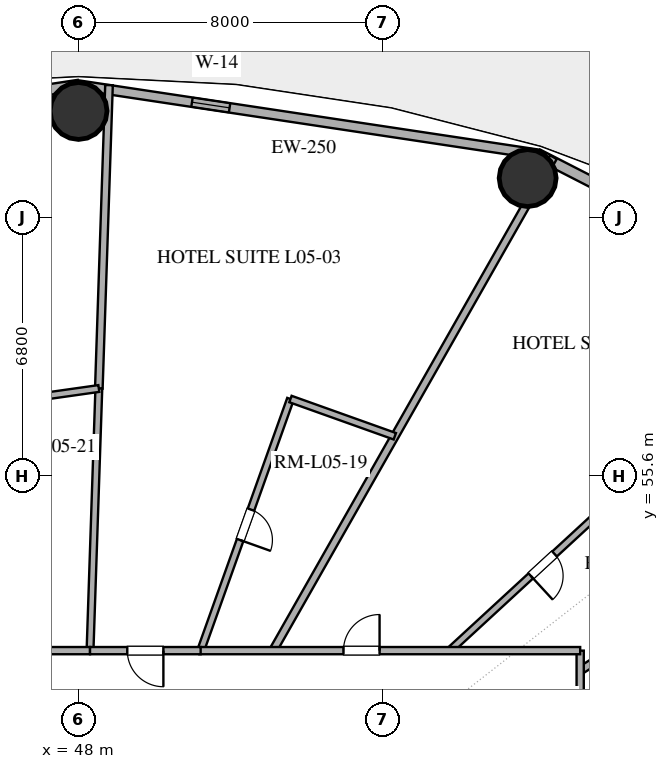
"""IFC4 building model, lengths in metres.
Left out: names, types, materials, properties, quantities, classifications, styles, units other than length and angle.
Written with IfcOpenShell. Run it as: python <this file> out.ifc"""

import sys

from ifc_helpers import new_model, si_unit, direction, frame, frame_2d, origin, origin_2d, place, context, subcontext, project, spatial, rectangle, hollow_circle, extrude, element, fill, save


model = new_model("IFC4")
c1 = context("Model", 3, precision=1e-05, world=origin(), true_north=direction((0.0, 1.0)))
c2 = subcontext(c1, "Body", "Model", "MODEL_VIEW")
j1 = project(units=[si_unit("LENGTHUNIT", "METRE"), si_unit("PLANEANGLEUNIT", "RADIAN")], contexts=[c1])
p1 = place(None, origin())
s1 = spatial("IfcSite", under=j1, at=p1, CompositionType="ELEMENT")
p2 = place(p1, origin())
s2 = spatial("IfcBuilding", under=s1, at=p2, CompositionType="ELEMENT")
p3 = place(p2, frame((0.0, 0.0, 28.2)))
s3 = spatial("IfcBuildingStorey", under=s2, at=p3, CompositionType="ELEMENT", Elevation=28.2)
for number, where, z_axis, x_axis in (
    (1, (59.818, 63.434, 0.0), (0.0, 0.0, 1.0), (1.0, 0.0, 0.0)),
    (2, (48.0, 65.2, 0.0), (0.0, 0.0, 1.0), (1.0, 0.0, 0.0)),
):
    element("IfcColumn", number, at=place(p3, frame(where, z_axis=z_axis, x_axis=x_axis)), inside=s3, PredefinedType="COLUMN", context=c2, shape_type="SweptSolid", body=[
        extrude(hollow_circle(Radius=0.75, WallThickness=0.04, at=origin_2d()), origin(), (0.0, 0.0, 1.0), 3.38),
    ])
p4 = place(p3, frame((70.174, 58.886, 0.0), z_axis=(0.0, 0.0, 1.0), x_axis=(-0.889853976658, 0.456245438581, 0.0)))
e3 = element("IfcWall", 3, at=p4, inside=s3, PredefinedType="SOLIDWALL", context=c2, shape_type="SweptSolid", body=[
    extrude(rectangle(XDim=11.346, YDim=0.28, at=frame_2d((5.673, 0.0))), origin(), (0.0, 0.0, 1.0), 3.38),
])
p5 = place(p4, frame((2.967, 0.0, 0.85)))
e4 = element("IfcOpeningElement", 4, at=p5, cuts=e3, PredefinedType="OPENING", context=c2, shape_type="SweptSolid", body=[
    extrude(rectangle(XDim=2.1, YDim=2.2, at=frame_2d((1.05, 1.1))), frame((0.0, 0.15, 0.0), z_axis=(0.0, -1.0, 0.0), x_axis=(1.0, 0.0, 0.0)), (0.0, 0.0, 1.0), 0.3),
])
p6 = place(p4, frame((6.429, 0.0, 0.85)))
e5 = element("IfcOpeningElement", 5, at=p6, cuts=e3, PredefinedType="OPENING", context=c2, shape_type="SweptSolid", body=[
    extrude(rectangle(XDim=2.1, YDim=2.2, at=frame_2d((1.05, 1.1))), frame((0.0, 0.15, 0.0), z_axis=(0.0, -1.0, 0.0), x_axis=(1.0, 0.0, 0.0)), (0.0, 0.0, 1.0), 0.3),
])
p7 = place(p3, frame((60.078, 64.062, 0.0), z_axis=(0.0, 0.0, 1.0), x_axis=(-0.988864835849, 0.148816452121, 0.0)))
e6 = element("IfcWall", 6, at=p7, inside=s3, PredefinedType="SOLIDWALL", context=c2, shape_type="SweptSolid", body=[
    extrude(rectangle(XDim=12.214, YDim=0.25, at=frame_2d((6.107, 0.0))), origin(), (0.0, 0.0, 1.0), 3.38),
])
p8 = place(p7, frame((8.195, 0.0, 1.42)))
e7 = element("IfcOpeningElement", 7, at=p8, cuts=e6, PredefinedType="OPENING", context=c2, shape_type="SweptSolid", body=[
    extrude(rectangle(XDim=1.0, YDim=1.05, at=frame_2d((0.5, 0.525))), frame((0.0, 0.135, 0.0), z_axis=(0.0, -1.0, 0.0), x_axis=(1.0, 0.0, 0.0)), (0.0, 0.0, 1.0), 0.27),
])
p9 = place(p3, frame((48.0, 65.88, 0.0), z_axis=(0.0, 0.0, 1.0), x_axis=(-0.988864835849, -0.148816452121, 0.0)))
e8 = element("IfcWall", 8, at=p9, inside=s3, PredefinedType="SOLIDWALL", context=c2, shape_type="SweptSolid", body=[
    extrude(rectangle(XDim=12.214, YDim=0.28, at=frame_2d((6.107, 0.0))), origin(), (0.0, 0.0, 1.0), 3.38),
])
p10 = place(p9, frame((1.531, 0.0, 0.0)))
e9 = element("IfcOpeningElement", 9, at=p10, cuts=e8, PredefinedType="OPENING", context=c2, shape_type="SweptSolid", body=[
    extrude(rectangle(XDim=1.1, YDim=2.25, at=frame_2d((0.55, 1.125))), frame((0.0, 0.15, 0.0), z_axis=(0.0, -1.0, 0.0), x_axis=(1.0, 0.0, 0.0)), (0.0, 0.0, 1.0), 0.3),
])
p11 = place(p3, frame((53.116, 51.0, 0.0), z_axis=(0.0, 0.0, 1.0), x_axis=(0.494167535405, 0.869366693031, 0.0)))
e10 = element("IfcWall", 10, at=p11, inside=s3, PredefinedType="PARTITIONING", context=c2, shape_type="SweptSolid", body=[
    extrude(rectangle(XDim=14.934, YDim=0.2, at=frame_2d((7.467, 0.0))), origin(), (0.0, 0.0, 1.0), 2.74),
])
p12 = place(p3, frame((48.802, 65.88, 0.0), z_axis=(0.0, 0.0, 1.0), x_axis=(-0.033562144005, -0.999436632553, 0.0)))
e11 = element("IfcWall", 11, at=p12, inside=s3, PredefinedType="PARTITIONING", context=c2, shape_type="SweptSolid", body=[
    extrude(rectangle(XDim=7.987, YDim=0.2, at=frame_2d((3.994, 0.0))), origin(), (0.0, 0.0, 1.0), 2.74),
])
p13 = place(p3, frame((61.2, 50.472, 0.0), z_axis=(0.0, 0.0, 1.0), x_axis=(0.841576538847, 0.540137879863, 0.0)))
e12 = element("IfcWall", 12, at=p13, inside=s3, PredefinedType="PARTITIONING", context=c2, shape_type="SweptSolid", body=[
    extrude(rectangle(XDim=12.487, YDim=0.2, at=frame_2d((6.244, 0.0))), origin(), (0.0, 0.0, 1.0), 2.74),
])
p14 = place(p3, frame((61.2, 51.0, 0.0), z_axis=(0.0, 0.0, 1.0), x_axis=(0.0, -1.0, 0.0)))
e13 = element("IfcWall", 13, at=p14, inside=s3, PredefinedType="PARTITIONING", context=c2, shape_type="SweptSolid", body=[
    extrude(rectangle(XDim=14.554, YDim=0.19, at=frame_2d((7.277, 0.0))), origin(), (0.0, 0.0, 1.0), 2.74),
])
p15 = place(p14, frame((3.684, 0.0, 0.0)))
e14 = element("IfcOpeningElement", 14, at=p15, cuts=e13, PredefinedType="OPENING", context=c2, shape_type="SweptSolid", body=[
    extrude(rectangle(XDim=1.0, YDim=2.2, at=frame_2d((0.5, 1.1))), frame((0.0, 0.105, 0.0), z_axis=(0.0, -1.0, 0.0), x_axis=(1.0, 0.0, 0.0)), (0.0, 0.0, 1.0), 0.21),
])
p16 = place(p14, frame((9.438, 0.0, 0.0)))
e15 = element("IfcOpeningElement", 15, at=p16, cuts=e13, PredefinedType="OPENING", context=c2, shape_type="SweptSolid", body=[
    extrude(rectangle(XDim=0.95, YDim=2.15, at=frame_2d((0.475, 1.075))), frame((0.0, 0.105, 0.0), z_axis=(0.0, -1.0, 0.0), x_axis=(1.0, 0.0, 0.0)), (0.0, 0.0, 1.0), 0.21),
])
p17 = place(p3, frame((53.576, 57.621, 0.0), z_axis=(0.0, 0.0, 1.0), x_axis=(-0.336213191961, -0.941785904307, 0.0)))
e16 = element("IfcWall", 16, at=p17, inside=s3, PredefinedType="PLUMBINGWALL", context=c2, shape_type="SweptSolid", body=[
    extrude(rectangle(XDim=7.03, YDim=0.18, at=frame_2d((3.515, 0.0))), origin(), (0.0, 0.0, 1.0), 2.74),
])
p18 = place(p17, frame((3.09, 0.0, 0.0)))
e17 = element("IfcOpeningElement", 17, at=p18, cuts=e16, PredefinedType="OPENING", context=c2, shape_type="SweptSolid", body=[
    extrude(rectangle(XDim=0.85, YDim=2.1, at=frame_2d((0.425, 1.05))), frame((0.0, 0.1, 0.0), z_axis=(0.0, -1.0, 0.0), x_axis=(1.0, 0.0, 0.0)), (0.0, 0.0, 1.0), 0.2),
])
p19 = place(p3, frame((48.534, 57.897, 0.0), z_axis=(0.0, 0.0, 1.0), x_axis=(-0.033537457551, -0.999437461246, 0.0)))
e18 = element("IfcWall", 18, at=p19, inside=s3, PredefinedType="PLUMBINGWALL", context=c2, shape_type="SweptSolid", body=[
    extrude(rectangle(XDim=6.901, YDim=0.18, at=frame_2d((3.451, 0.0))), origin(), (0.0, 0.0, 1.0), 2.74),
])
p20 = place(p3, frame((62.66, 55.51, 0.0), z_axis=(0.0, 0.0, 1.0), x_axis=(-0.735369975398, -0.67766584633, 0.0)))
e19 = element("IfcWall", 19, at=p20, inside=s3, PredefinedType="PLUMBINGWALL", context=c2, shape_type="SweptSolid", body=[
    extrude(rectangle(XDim=6.655, YDim=0.18, at=frame_2d((3.328, 0.0))), origin(), (0.0, 0.0, 1.0), 2.74),
])
p21 = place(p20, frame((2.903, 0.0, 0.0)))
e20 = element("IfcOpeningElement", 20, at=p21, cuts=e19, PredefinedType="OPENING", context=c2, shape_type="SweptSolid", body=[
    extrude(rectangle(XDim=0.85, YDim=2.1, at=frame_2d((0.425, 1.05))), frame((0.0, 0.1, 0.0), z_axis=(0.0, -1.0, 0.0), x_axis=(1.0, 0.0, 0.0)), (0.0, 0.0, 1.0), 0.2),
])
p22 = place(p3, frame((51.179, 51.0, 0.0), z_axis=(0.0, 0.0, 1.0), x_axis=(1.0, 0.0, 0.0)))
e21 = element("IfcWall", 21, at=p22, inside=s3, PredefinedType="PARTITIONING", context=c2, shape_type="SweptSolid", body=[
    extrude(rectangle(XDim=10.021, YDim=0.19, at=frame_2d((5.01, 0.0))), origin(), (0.0, 0.0, 1.0), 2.74),
])
p23 = place(p22, frame((3.792, 0.0, 0.0)))
e22 = element("IfcOpeningElement", 22, at=p23, cuts=e21, PredefinedType="OPENING", context=c2, shape_type="SweptSolid", body=[
    extrude(rectangle(XDim=0.95, YDim=2.15, at=frame_2d((0.475, 1.075))), frame((0.0, 0.105, 0.0), z_axis=(0.0, -1.0, 0.0), x_axis=(1.0, 0.0, 0.0)), (0.0, 0.0, 1.0), 0.21),
])
p24 = place(p3, frame((43.62, 51.0, 0.0), z_axis=(0.0, 0.0, 1.0), x_axis=(1.0, 0.0, 0.0)))
e23 = element("IfcWall", 23, at=p24, inside=s3, PredefinedType="PARTITIONING", context=c2, shape_type="SweptSolid", body=[
    extrude(rectangle(XDim=4.683, YDim=0.19, at=frame_2d((2.341, 0.0))), origin(), (0.0, 0.0, 1.0), 2.74),
])
p25 = place(p24, frame((1.095, 0.0, 0.0)))
e24 = element("IfcOpeningElement", 24, at=p25, cuts=e23, PredefinedType="OPENING", context=c2, shape_type="SweptSolid", body=[
    extrude(rectangle(XDim=0.95, YDim=2.15, at=frame_2d((0.475, 1.075))), frame((0.0, 0.105, 0.0), z_axis=(0.0, -1.0, 0.0), x_axis=(1.0, 0.0, 0.0)), (0.0, 0.0, 1.0), 0.21),
])
p26 = place(p3, frame((56.322, 56.64, 0.0), z_axis=(0.0, 0.0, 1.0), x_axis=(-0.94177979862, 0.336230294457, 0.0)))
e25 = element("IfcWall", 25, at=p26, inside=s3, PredefinedType="PLUMBINGWALL", context=c2, shape_type="SweptSolid", body=[
    extrude(rectangle(XDim=2.915, YDim=0.18, at=frame_2d((1.458, 0.0))), origin(), (0.0, 0.0, 1.0), 2.74),
])
p27 = place(p3, frame((51.213, 51.0, 0.0), z_axis=(0.0, 0.0, 1.0), x_axis=(-1.0, 0.0, 0.0)))
e26 = element("IfcWall", 26, at=p27, inside=s3, PredefinedType="PARTITIONING", context=c2, shape_type="SweptSolid", body=[
    extrude(rectangle(XDim=2.911, YDim=0.19, at=frame_2d((1.455, 0.0))), origin(), (0.0, 0.0, 1.0), 2.74),
])
p28 = place(p27, frame((0.98, 0.0, 0.0)))
e27 = element("IfcOpeningElement", 27, at=p28, cuts=e26, PredefinedType="OPENING", context=c2, shape_type="SweptSolid", body=[
    extrude(rectangle(XDim=0.95, YDim=2.15, at=frame_2d((0.475, 1.075))), frame((0.0, 0.105, 0.0), z_axis=(0.0, -1.0, 0.0), x_axis=(1.0, 0.0, 0.0)), (0.0, 0.0, 1.0), 0.21),
])
p29 = place(p3, frame((45.807, 57.512, 0.0), z_axis=(0.0, 0.0, 1.0), x_axis=(0.990152382036, 0.139993786823, 0.0)))
e28 = element("IfcWall", 28, at=p29, inside=s3, PredefinedType="PLUMBINGWALL", context=c2, shape_type="SweptSolid", body=[
    extrude(rectangle(XDim=2.754, YDim=0.18, at=frame_2d((1.377, 0.0))), origin(), (0.0, 0.0, 1.0), 2.74),
])
p30 = place(p8, origin())
e29 = element("IfcWindow", 29, at=p30, inside=s3, PartitioningType="SINGLE_PANEL", PredefinedType="WINDOW", context=c2, shape_type="SweptSolid", body=[
    extrude(rectangle(XDim=1.0, YDim=1.05, at=frame_2d((0.5, 0.525))), frame((0.0, 0.03, 0.0), z_axis=(0.0, -1.0, 0.0), x_axis=(1.0, 0.0, 0.0)), (0.0, 0.0, 1.0), 0.06),
])
fill(e7, e29)
p31 = place(p18, origin())
e30 = element("IfcDoor", 30, at=p31, inside=s3, OperationType="SINGLE_SWING_RIGHT", PredefinedType="DOOR", context=c2, shape_type="SweptSolid", body=[
    extrude(rectangle(XDim=0.85, YDim=2.1, at=frame_2d((0.425, 1.05))), frame((0.0, 0.025, 0.0), z_axis=(0.0, -1.0, 0.0), x_axis=(1.0, 0.0, 0.0)), (0.0, 0.0, 1.0), 0.05),
])
fill(e17, e30)
p32 = place(p21, origin())
e31 = element("IfcDoor", 31, at=p32, inside=s3, OperationType="SINGLE_SWING_RIGHT", PredefinedType="DOOR", context=c2, shape_type="SweptSolid", body=[
    extrude(rectangle(XDim=0.85, YDim=2.1, at=frame_2d((0.425, 1.05))), frame((0.0, 0.025, 0.0), z_axis=(0.0, -1.0, 0.0), x_axis=(1.0, 0.0, 0.0)), (0.0, 0.0, 1.0), 0.05),
])
fill(e20, e31)
p33 = place(p23, origin())
e32 = element("IfcDoor", 32, at=p33, inside=s3, OperationType="SINGLE_SWING_RIGHT", PredefinedType="DOOR", context=c2, shape_type="SweptSolid", body=[
    extrude(rectangle(XDim=0.95, YDim=2.15, at=frame_2d((0.475, 1.075))), frame((0.0, 0.025, 0.0), z_axis=(0.0, -1.0, 0.0), x_axis=(1.0, 0.0, 0.0)), (0.0, 0.0, 1.0), 0.05),
])
fill(e22, e32)
p34 = place(p28, origin())
e33 = element("IfcDoor", 33, at=p34, inside=s3, OperationType="SINGLE_SWING_LEFT", PredefinedType="DOOR", context=c2, shape_type="SweptSolid", body=[
    extrude(rectangle(XDim=0.95, YDim=2.15, at=frame_2d((0.475, 1.075))), frame((0.0, 0.025, 0.0), z_axis=(0.0, -1.0, 0.0), x_axis=(1.0, 0.0, 0.0)), (0.0, 0.0, 1.0), 0.05),
])
fill(e27, e33)
save(model, sys.argv[1])
